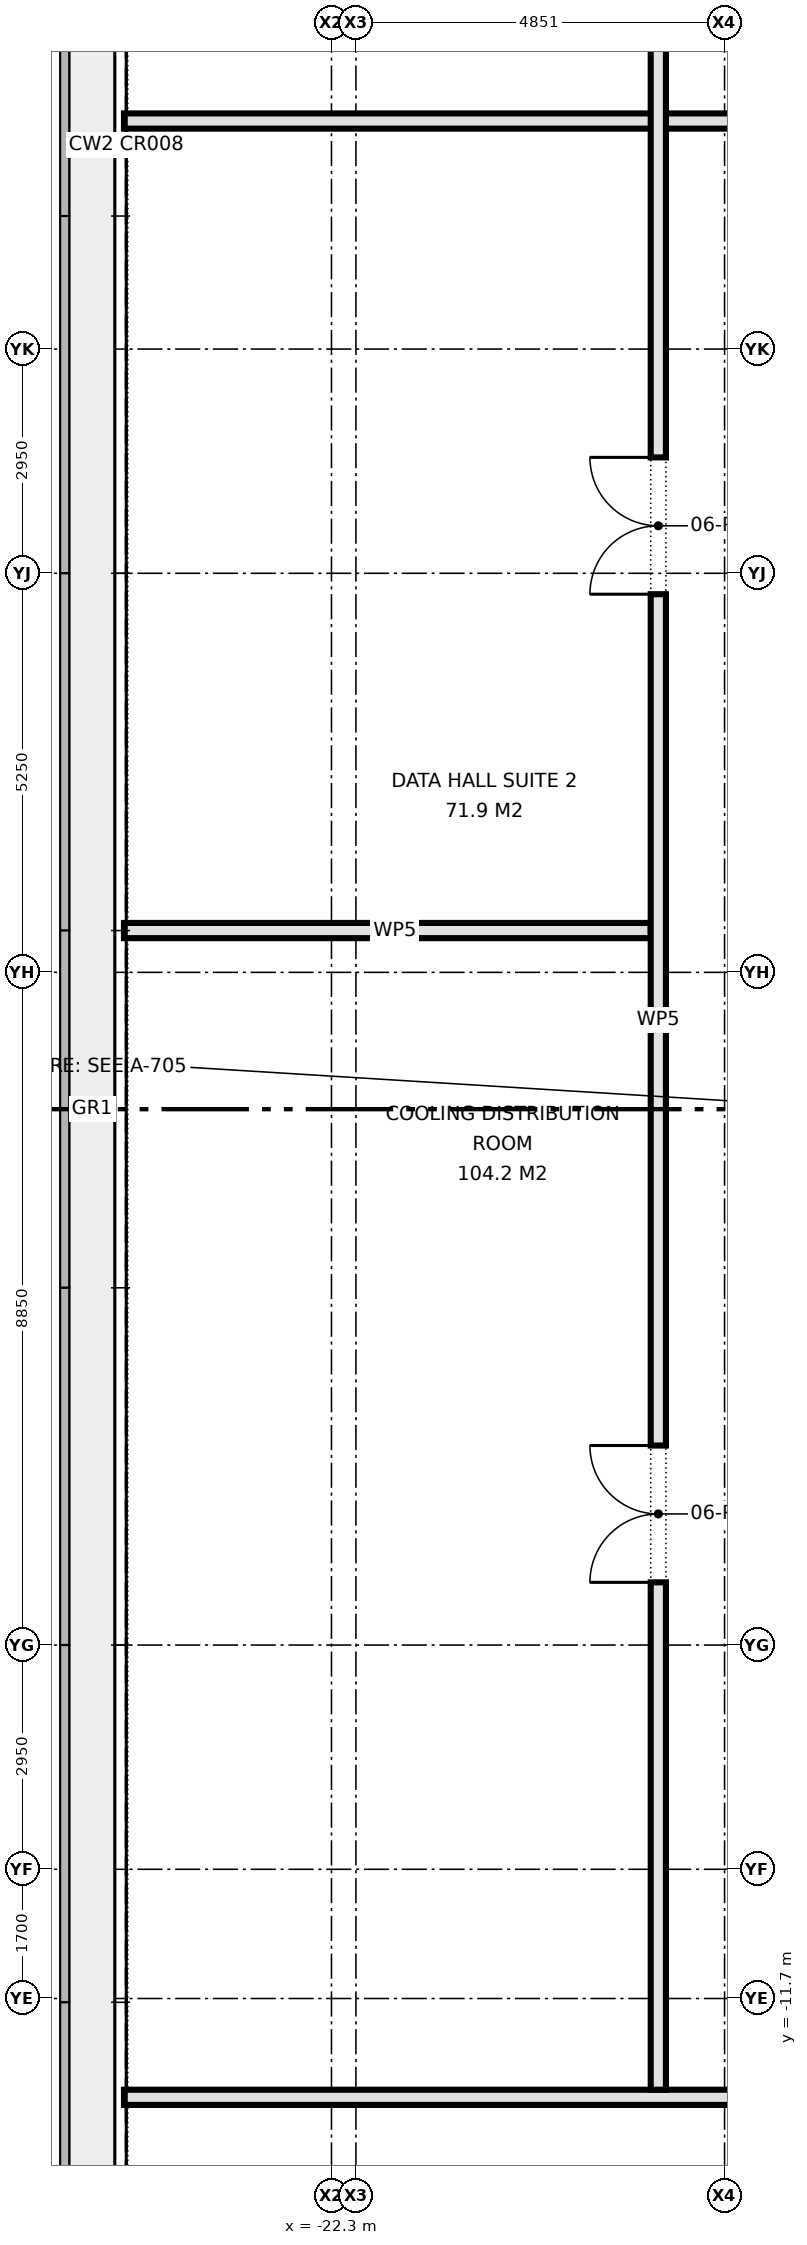
"""IFC4 building model, lengths in metres.
Left out: names, types, materials, properties, quantities, classifications, styles, units other than length and angle.
Written with IfcOpenShell. Run it as: python <this file> out.ifc"""

import sys

from ifc_helpers import new_model, si_unit, direction, frame, frame_2d, origin, place, context, subcontext, project, spatial, rectangle, extrude, element, fill, save


model = new_model("IFC4")
c1 = context("Model", 3, precision=1e-05, world=origin(), true_north=direction((0.0, 1.0)))
c2 = subcontext(c1, "Body", "Model", "MODEL_VIEW")
j1 = project(units=[si_unit("LENGTHUNIT", "METRE"), si_unit("PLANEANGLEUNIT", "RADIAN")], contexts=[c1])
p1 = place(None, origin())
s1 = spatial("IfcSite", under=j1, at=p1, CompositionType="ELEMENT")
p2 = place(p1, origin())
s2 = spatial("IfcBuilding", under=s1, at=p2, CompositionType="ELEMENT")
p3 = place(p2, frame((0.0, 0.0, 25.7)))
s3 = spatial("IfcBuildingStorey", under=s2, at=p3, CompositionType="ELEMENT", Elevation=25.7)
p4 = place(p3, frame((-25.03, -13.0, 0.0), z_axis=(0.0, 0.0, 1.0), x_axis=(1.0, 0.0, 0.0)))
e1 = element("IfcWall", 1, at=p4, inside=s3, PredefinedType="PARTITIONING", context=c2, shape_type="SweptSolid", body=[
    extrude(rectangle(XDim=50.06, YDim=0.2, at=frame_2d((25.03, 0.0))), origin(), (0.0, 0.0, 1.0), 4.575),
])
p5 = place(p4, frame((9.25, 0.0, 0.0)))
e2 = element("IfcOpeningElement", 2, at=p5, cuts=e1, PredefinedType="OPENING", context=c2, shape_type="SweptSolid", body=[
    extrude(rectangle(XDim=1.8, YDim=2.1, at=frame_2d((0.9, 1.05))), frame((0.0, 0.11, 0.0), z_axis=(0.0, -1.0, 0.0), x_axis=(1.0, 0.0, 0.0)), (0.0, 0.0, 1.0), 0.22),
])
p6 = place(p4, frame((17.08, 0.0, 0.0)))
e3 = element("IfcOpeningElement", 3, at=p6, cuts=e1, PredefinedType="OPENING", context=c2, shape_type="SweptSolid", body=[
    extrude(rectangle(XDim=1.8, YDim=2.1, at=frame_2d((0.9, 1.05))), frame((0.0, 0.11, 0.0), z_axis=(0.0, -1.0, 0.0), x_axis=(1.0, 0.0, 0.0)), (0.0, 0.0, 1.0), 0.22),
])
p7 = place(p4, frame((36.06, 0.0, 0.0)))
e4 = element("IfcOpeningElement", 4, at=p7, cuts=e1, PredefinedType="OPENING", context=c2, shape_type="SweptSolid", body=[
    extrude(rectangle(XDim=1.8, YDim=2.1, at=frame_2d((0.9, 1.05))), frame((0.0, 0.11, 0.0), z_axis=(0.0, -1.0, 0.0), x_axis=(1.0, 0.0, 0.0)), (0.0, 0.0, 1.0), 0.22),
])
p8 = place(p4, frame((23.68, 0.0, 0.0)))
e5 = element("IfcOpeningElement", 5, at=p8, cuts=e1, PredefinedType="OPENING", context=c2, shape_type="SweptSolid", body=[
    extrude(rectangle(XDim=1.0, YDim=2.1, at=frame_2d((0.5, 1.05))), frame((0.0, 0.11, 0.0), z_axis=(0.0, -1.0, 0.0), x_axis=(1.0, 0.0, 0.0)), (0.0, 0.0, 1.0), 0.22),
])
p9 = place(p4, frame((26.68, 0.0, 0.0)))
e6 = element("IfcOpeningElement", 6, at=p9, cuts=e1, PredefinedType="OPENING", context=c2, shape_type="SweptSolid", body=[
    extrude(rectangle(XDim=1.0, YDim=2.1, at=frame_2d((0.5, 1.05))), frame((0.0, 0.11, 0.0), z_axis=(0.0, -1.0, 0.0), x_axis=(1.0, 0.0, 0.0)), (0.0, 0.0, 1.0), 0.22),
])
p10 = place(p4, frame((29.28, 0.0, 0.0)))
e7 = element("IfcOpeningElement", 7, at=p10, cuts=e1, PredefinedType="OPENING", context=c2, shape_type="SweptSolid", body=[
    extrude(rectangle(XDim=1.0, YDim=2.1, at=frame_2d((0.5, 1.05))), frame((0.0, 0.11, 0.0), z_axis=(0.0, -1.0, 0.0), x_axis=(1.0, 0.0, 0.0)), (0.0, 0.0, 1.0), 0.22),
])
p11 = place(p3, frame((-25.03, 2.35, 0.0), z_axis=(0.0, 0.0, 1.0), x_axis=(1.0, 0.0, 0.0)))
e8 = element("IfcWall", 8, at=p11, inside=s3, PredefinedType="PARTITIONING", context=c2, shape_type="SweptSolid", body=[
    extrude(rectangle(XDim=6.93, YDim=0.2, at=frame_2d((3.465, 0.0))), origin(), (0.0, 0.0, 1.0), 4.575),
])
p12 = place(p3, frame((-25.03, 13.0, 0.0), z_axis=(0.0, 0.0, 1.0), x_axis=(1.0, 0.0, 0.0)))
e9 = element("IfcWall", 9, at=p12, inside=s3, PredefinedType="PARTITIONING", context=c2, shape_type="SweptSolid", body=[
    extrude(rectangle(XDim=50.06, YDim=0.2, at=frame_2d((25.03, 0.0))), origin(), (0.0, 0.0, 1.0), 4.575),
])
p13 = place(p12, frame((15.855, 0.0, 0.0)))
e10 = element("IfcOpeningElement", 10, at=p13, cuts=e9, PredefinedType="OPENING", context=c2, shape_type="SweptSolid", body=[
    extrude(rectangle(XDim=1.8, YDim=2.1, at=frame_2d((0.9, 1.05))), frame((0.0, 0.11, 0.0), z_axis=(0.0, -1.0, 0.0), x_axis=(1.0, 0.0, 0.0)), (0.0, 0.0, 1.0), 0.22),
])
p14 = place(p12, frame((8.03, 0.0, 0.0)))
e11 = element("IfcOpeningElement", 11, at=p14, cuts=e9, PredefinedType="OPENING", context=c2, shape_type="SweptSolid", body=[
    extrude(rectangle(XDim=1.8, YDim=2.1, at=frame_2d((0.9, 1.05))), frame((0.0, 0.11, 0.0), z_axis=(0.0, -1.0, 0.0), x_axis=(1.0, 0.0, 0.0)), (0.0, 0.0, 1.0), 0.22),
])
p15 = place(p12, frame((31.96, 0.0, 0.0)))
e12 = element("IfcOpeningElement", 12, at=p15, cuts=e9, PredefinedType="OPENING", context=c2, shape_type="SweptSolid", body=[
    extrude(rectangle(XDim=1.8, YDim=2.1, at=frame_2d((0.9, 1.05))), frame((0.0, 0.11, 0.0), z_axis=(0.0, -1.0, 0.0), x_axis=(1.0, 0.0, 0.0)), (0.0, 0.0, 1.0), 0.22),
])
p16 = place(p3, frame((-18.0, -12.9, 0.0), z_axis=(0.0, 0.0, 1.0), x_axis=(0.0, 1.0, 0.0)))
e13 = element("IfcWall", 13, at=p16, inside=s3, PredefinedType="PARTITIONING", context=c2, shape_type="SweptSolid", body=[
    extrude(rectangle(XDim=30.3, YDim=0.2, at=frame_2d((15.15, 0.0))), origin(), (0.0, 0.0, 1.0), 4.575),
])
p17 = place(p16, frame((6.675, 0.0, 0.0)))
e14 = element("IfcOpeningElement", 14, at=p17, cuts=e13, PredefinedType="OPENING", context=c2, shape_type="SweptSolid", body=[
    extrude(rectangle(XDim=1.8, YDim=2.1, at=frame_2d((0.9, 1.05))), frame((0.0, 0.11, 0.0), z_axis=(0.0, -1.0, 0.0), x_axis=(1.0, 0.0, 0.0)), (0.0, 0.0, 1.0), 0.22),
])
p18 = place(p16, frame((19.675, 0.0, 0.0)))
e15 = element("IfcOpeningElement", 15, at=p18, cuts=e13, PredefinedType="OPENING", context=c2, shape_type="SweptSolid", body=[
    extrude(rectangle(XDim=1.8, YDim=2.1, at=frame_2d((0.9, 1.05))), frame((0.0, 0.11, 0.0), z_axis=(0.0, -1.0, 0.0), x_axis=(1.0, 0.0, 0.0)), (0.0, 0.0, 1.0), 0.22),
])
p19 = place(p17, origin())
e16 = element("IfcDoor", 16, at=p19, inside=s3, OperationType="DOUBLE_DOOR_SINGLE_SWING", PredefinedType="DOOR", context=c2, shape_type="SweptSolid", body=[
    extrude(rectangle(XDim=1.8, YDim=2.1, at=frame_2d((0.9, 1.05))), frame((0.0, 0.025, 0.0), z_axis=(0.0, -1.0, 0.0), x_axis=(1.0, 0.0, 0.0)), (0.0, 0.0, 1.0), 0.05),
])
fill(e14, e16)
p20 = place(p18, origin())
e17 = element("IfcDoor", 17, at=p20, inside=s3, OperationType="DOUBLE_DOOR_SINGLE_SWING", PredefinedType="DOOR", context=c2, shape_type="SweptSolid", body=[
    extrude(rectangle(XDim=1.8, YDim=2.1, at=frame_2d((0.9, 1.05))), frame((0.0, 0.025, 0.0), z_axis=(0.0, -1.0, 0.0), x_axis=(1.0, 0.0, 0.0)), (0.0, 0.0, 1.0), 0.05),
])
fill(e15, e17)
save(model, sys.argv[1])
